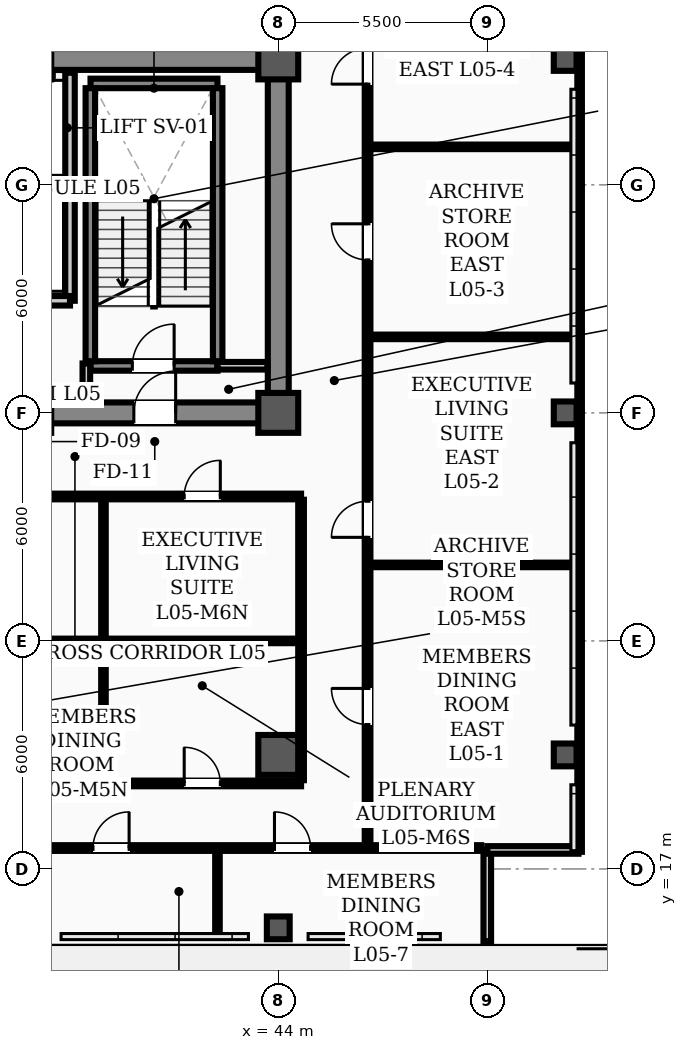
"""IFC4 building model, lengths in metres.
Left out: names, types, materials, properties, quantities, classifications, styles, units other than length and angle.
Written with IfcOpenShell. Run it as: python <this file> out.ifc"""

import sys

from ifc_helpers import new_model, si_unit, direction, frame, frame_2d, origin, origin_2d, place, context, subcontext, project, spatial, rectangle, hollow_rectangle, extrude, element, fill, save


model = new_model("IFC4")
c1 = context("Model", 3, precision=1e-05, world=origin(), true_north=direction((0.0, 1.0)))
c2 = subcontext(c1, "Body", "Model", "MODEL_VIEW")
j1 = project(units=[si_unit("LENGTHUNIT", "METRE"), si_unit("PLANEANGLEUNIT", "RADIAN")], contexts=[c1])
p1 = place(None, origin())
s1 = spatial("IfcSite", under=j1, at=p1, CompositionType="ELEMENT")
p2 = place(p1, origin())
s2 = spatial("IfcBuilding", under=s1, at=p2, CompositionType="ELEMENT")
p3 = place(p2, frame((0.0, 0.0, 22.0)))
s3 = spatial("IfcBuildingStorey", under=s2, at=p3, CompositionType="ELEMENT", Elevation=22.0)
for number, where, z_axis, x_axis in (
    (1, (44.0, 29.0, 0.0), (0.0, 0.0, 1.0), (1.0, 0.0, 0.0)),
    (2, (44.0, 38.3, 0.0), (0.0, 0.0, 1.0), (1.0, 0.0, 0.0)),
    (3, (44.0, 20.0, 0.0), (0.0, 0.0, 1.0), (1.0, 0.0, 0.0)),
):
    element("IfcColumn", number, at=place(p3, frame(where, z_axis=z_axis, x_axis=x_axis)), inside=s3, PredefinedType="COLUMN", context=c2, shape_type="SweptSolid", body=[
        extrude(hollow_rectangle(XDim=1.05, YDim=1.05, WallThickness=0.038, InnerFilletRadius=0.019, OuterFilletRadius=0.057, at=origin_2d()), origin(), (0.0, 0.0, 1.0), 4.5),
    ])
for number, where, z_axis, x_axis in (
    (4, (44.0, 15.45, 0.0), (0.0, 0.0, 1.0), (1.0, 0.0, 0.0)),
    (5, (51.55, 20.0, 0.0), (0.0, 0.0, 1.0), (1.0, 0.0, 0.0)),
    (6, (51.55, 29.0, 0.0), (0.0, 0.0, 1.0), (1.0, 0.0, 0.0)),
    (7, (51.55, 38.3, 0.0), (0.0, 0.0, 1.0), (1.0, 0.0, 0.0)),
):
    element("IfcColumn", number, at=place(p3, frame(where, z_axis=z_axis, x_axis=x_axis)), inside=s3, PredefinedType="COLUMN", context=c2, shape_type="SweptSolid", body=[
        extrude(hollow_rectangle(XDim=0.6, YDim=0.6, WallThickness=0.026, InnerFilletRadius=0.013, OuterFilletRadius=0.039, at=origin_2d()), origin(), (0.0, 0.0, 1.0), 4.5),
    ])
for number, where, z_axis, x_axis in (
    (8, (49.5, 15.1, 0.0), (0.0, 0.0, 1.0), (0.0, 1.0, 0.0)),
    (9, (49.5, 17.5, 0.0), (0.0, 0.0, 1.0), (1.0, 0.0, 0.0)),
):
    element("IfcWall", number, at=place(p3, frame(where, z_axis=z_axis, x_axis=x_axis)), inside=s3, PredefinedType="PARAPET", context=c2, shape_type="SweptSolid", body=[
        extrude(rectangle(XDim=2.4, YDim=0.2, at=frame_2d((1.2, 0.0))), origin(), (0.0, 0.0, 1.0), 1.2),
    ])
p4 = place(p3, frame((51.93, 17.45, 0.0), z_axis=(0.0, 0.0, 1.0), x_axis=(0.0, 1.0, 0.0)))
e10 = element("IfcWall", 10, at=p4, inside=s3, PredefinedType="PARAPET", context=c2, shape_type="SweptSolid", body=[
    extrude(rectangle(XDim=27.1, YDim=0.12, at=frame_2d((13.55, 0.0))), origin(), (0.0, 0.0, 1.0), 1.2),
])
p5 = place(p3, frame((13.5, 29.0, 0.0), z_axis=(0.0, 0.0, 1.0), x_axis=(1.0, 0.0, 0.0)))
e11 = element("IfcWall", 11, at=p5, inside=s3, PredefinedType="SHEAR", context=c2, shape_type="SweptSolid", body=[
    extrude(rectangle(XDim=30.5, YDim=0.55, at=frame_2d((15.25, 0.0))), origin(), (0.0, 0.0, 1.0), 4.32),
])
p6 = place(p5, frame((1.75, 0.0, 0.0)))
e12 = element("IfcOpeningElement", 12, at=p6, cuts=e11, PredefinedType="OPENING", context=c2, shape_type="SweptSolid", body=[
    extrude(rectangle(XDim=1.1, YDim=2.08, at=frame_2d((0.55, 1.04))), frame((0.0, 0.285, 0.0), z_axis=(0.0, -1.0, 0.0), x_axis=(1.0, 0.0, 0.0)), (0.0, 0.0, 1.0), 0.57),
])
p7 = place(p5, frame((26.7, 0.0, 0.0)))
e13 = element("IfcOpeningElement", 13, at=p7, cuts=e11, PredefinedType="OPENING", context=c2, shape_type="SweptSolid", body=[
    extrude(rectangle(XDim=1.1, YDim=2.08, at=frame_2d((0.55, 1.04))), frame((0.0, 0.285, 0.0), z_axis=(0.0, -1.0, 0.0), x_axis=(1.0, 0.0, 0.0)), (0.0, 0.0, 1.0), 0.57),
])
p8 = place(p5, frame((6.8, 0.0, 0.0)))
e14 = element("IfcOpeningElement", 14, at=p8, cuts=e11, PredefinedType="OPENING", context=c2, shape_type="SweptSolid", body=[
    extrude(rectangle(XDim=1.1, YDim=2.08, at=frame_2d((0.55, 1.04))), frame((0.0, 0.285, 0.0), z_axis=(0.0, -1.0, 0.0), x_axis=(1.0, 0.0, 0.0)), (0.0, 0.0, 1.0), 0.57),
])
p9 = place(p5, frame((13.2, 0.0, 0.0)))
e15 = element("IfcOpeningElement", 15, at=p9, cuts=e11, PredefinedType="OPENING", context=c2, shape_type="SweptSolid", body=[
    extrude(rectangle(XDim=1.6, YDim=2.08, at=frame_2d((0.8, 1.04))), frame((0.0, 0.285, 0.0), z_axis=(0.0, -1.0, 0.0), x_axis=(1.0, 0.0, 0.0)), (0.0, 0.0, 1.0), 0.57),
])
p10 = place(p5, frame((19.5, 0.0, 0.0)))
e16 = element("IfcOpeningElement", 16, at=p10, cuts=e11, PredefinedType="OPENING", context=c2, shape_type="SweptSolid", body=[
    extrude(rectangle(XDim=0.9, YDim=2.08, at=frame_2d((0.45, 1.04))), frame((0.0, 0.285, 0.0), z_axis=(0.0, -1.0, 0.0), x_axis=(1.0, 0.0, 0.0)), (0.0, 0.0, 1.0), 0.57),
])
p11 = place(p5, frame((21.55, 0.0, 0.0)))
e17 = element("IfcOpeningElement", 17, at=p11, cuts=e11, PredefinedType="OPENING", context=c2, shape_type="SweptSolid", body=[
    extrude(rectangle(XDim=0.9, YDim=2.08, at=frame_2d((0.45, 1.04))), frame((0.0, 0.285, 0.0), z_axis=(0.0, -1.0, 0.0), x_axis=(1.0, 0.0, 0.0)), (0.0, 0.0, 1.0), 0.57),
])
p12 = place(p3, frame((13.5, 38.3, 0.0), z_axis=(0.0, 0.0, 1.0), x_axis=(1.0, 0.0, 0.0)))
e18 = element("IfcWall", 18, at=p12, inside=s3, PredefinedType="SHEAR", context=c2, shape_type="SweptSolid", body=[
    extrude(rectangle(XDim=30.5, YDim=0.55, at=frame_2d((15.25, 0.0))), origin(), (0.0, 0.0, 1.0), 4.32),
])
p13 = place(p3, frame((44.0, 29.35, 0.0), z_axis=(0.0, 0.0, 1.0), x_axis=(0.0, 1.0, 0.0)))
e19 = element("IfcWall", 19, at=p13, inside=s3, PredefinedType="SHEAR", context=c2, shape_type="SweptSolid", body=[
    extrude(rectangle(XDim=8.6, YDim=0.55, at=frame_2d((4.3, 0.0))), origin(), (0.0, 0.0, 1.0), 4.32),
])
p14 = place(p3, frame((39.06, 30.235, 0.0), z_axis=(0.0, 0.0, 1.0), x_axis=(1.0, 0.0, 0.0)))
e20 = element("IfcWall", 20, at=p14, inside=s3, PredefinedType="STANDARD", context=c2, shape_type="SweptSolid", body=[
    extrude(rectangle(XDim=3.34, YDim=0.25, at=frame_2d((1.67, 0.0))), origin(), (0.0, 0.0, 1.0), 4.32),
])
p15 = place(p14, frame((1.1, 0.0, 0.0)))
e21 = element("IfcOpeningElement", 21, at=p15, cuts=e20, PredefinedType="OPENING", context=c2, shape_type="SweptSolid", body=[
    extrude(rectangle(XDim=1.1, YDim=2.08, at=frame_2d((0.55, 1.04))), frame((0.0, 0.135, 0.0), z_axis=(0.0, -1.0, 0.0), x_axis=(1.0, 0.0, 0.0)), (0.0, 0.0, 1.0), 0.27),
])
p16 = place(p3, frame((39.06, 37.669, 0.0), z_axis=(0.0, 0.0, 1.0), x_axis=(1.0, 0.0, 0.0)))
e22 = element("IfcWall", 22, at=p16, inside=s3, PredefinedType="STANDARD", context=c2, shape_type="SweptSolid", body=[
    extrude(rectangle(XDim=3.34, YDim=0.25, at=frame_2d((1.67, 0.0))), origin(), (0.0, 0.0, 1.0), 4.32),
])
for number, where, z_axis, x_axis in (
    (23, (39.055, 30.36, 0.0), (0.0, 0.0, 1.0), (0.0, 1.0, 0.0)),
    (24, (42.405, 30.36, 0.0), (0.0, 0.0, 1.0), (0.0, 1.0, 0.0)),
):
    element("IfcWall", number, at=place(p3, frame(where, z_axis=z_axis, x_axis=x_axis)), inside=s3, PredefinedType="STANDARD", context=c2, shape_type="SweptSolid", body=[
        extrude(rectangle(XDim=7.184, YDim=0.25, at=frame_2d((3.592, 0.0))), origin(), (0.0, 0.0, 1.0), 4.32),
    ])
p17 = place(p3, frame((38.52, 31.95, 0.0), z_axis=(0.0, 0.0, 1.0), x_axis=(0.0, 1.0, 0.0)))
e25 = element("IfcWall", 25, at=p17, inside=s3, PredefinedType="STANDARD", context=c2, shape_type="SweptSolid", body=[
    extrude(rectangle(XDim=6.0, YDim=0.25, at=frame_2d((3.0, 0.0))), origin(), (0.0, 0.0, 1.0), 3.9),
])
p18 = place(p3, frame((36.62, 31.95, 0.0), z_axis=(0.0, 0.0, 1.0), x_axis=(1.0, 0.0, 0.0)))
e26 = element("IfcWall", 26, at=p18, inside=s3, PredefinedType="STANDARD", context=c2, shape_type="SweptSolid", body=[
    extrude(rectangle(XDim=1.9, YDim=0.25, at=frame_2d((0.95, 0.0))), origin(), (0.0, 0.0, 1.0), 4.08),
])
p19 = place(p3, frame((42.4, 30.24, 0.0), z_axis=(0.0, 0.0, 1.0), x_axis=(1.0, 0.0, 0.0)))
e27 = element("IfcWall", 27, at=p19, inside=s3, PredefinedType="STANDARD", context=c2, shape_type="SweptSolid", body=[
    extrude(rectangle(XDim=1.315, YDim=0.2, at=frame_2d((0.658, 0.0))), origin(), (0.0, 0.0, 1.0), 3.7),
])
p20 = place(p3, frame((12.9, 26.8, 0.0), z_axis=(0.0, 0.0, 1.0), x_axis=(1.0, 0.0, 0.0)))
e28 = element("IfcWall", 28, at=p20, inside=s3, PredefinedType="PARTITIONING", context=c2, shape_type="SweptSolid", body=[
    extrude(rectangle(XDim=31.7, YDim=0.15, at=frame_2d((15.85, 0.0))), origin(), (0.0, 0.0, 1.0), 3.7),
])
p21 = place(p20, frame((13.6, 0.0, 0.0)))
e29 = element("IfcOpeningElement", 29, at=p21, cuts=e28, PredefinedType="OPENING", context=c2, shape_type="SweptSolid", body=[
    extrude(rectangle(XDim=1.6, YDim=2.08, at=frame_2d((0.8, 1.04))), frame((0.0, 0.085, 0.0), z_axis=(0.0, -1.0, 0.0), x_axis=(1.0, 0.0, 0.0)), (0.0, 0.0, 1.0), 0.17),
])
p22 = place(p20, frame((1.775, 0.0, 0.0)))
e30 = element("IfcOpeningElement", 30, at=p22, cuts=e28, PredefinedType="OPENING", context=c2, shape_type="SweptSolid", body=[
    extrude(rectangle(XDim=0.95, YDim=2.08, at=frame_2d((0.475, 1.04))), frame((0.0, 0.085, 0.0), z_axis=(0.0, -1.0, 0.0), x_axis=(1.0, 0.0, 0.0)), (0.0, 0.0, 1.0), 0.17),
])
p23 = place(p20, frame((6.225, 0.0, 0.0)))
e31 = element("IfcOpeningElement", 31, at=p23, cuts=e28, PredefinedType="OPENING", context=c2, shape_type="SweptSolid", body=[
    extrude(rectangle(XDim=0.95, YDim=2.08, at=frame_2d((0.475, 1.04))), frame((0.0, 0.085, 0.0), z_axis=(0.0, -1.0, 0.0), x_axis=(1.0, 0.0, 0.0)), (0.0, 0.0, 1.0), 0.17),
])
p24 = place(p20, frame((10.625, 0.0, 0.0)))
e32 = element("IfcOpeningElement", 32, at=p24, cuts=e28, PredefinedType="OPENING", context=c2, shape_type="SweptSolid", body=[
    extrude(rectangle(XDim=0.95, YDim=2.08, at=frame_2d((0.475, 1.04))), frame((0.0, 0.085, 0.0), z_axis=(0.0, -1.0, 0.0), x_axis=(1.0, 0.0, 0.0)), (0.0, 0.0, 1.0), 0.17),
])
p25 = place(p20, frame((16.075, 0.0, 0.0)))
e33 = element("IfcOpeningElement", 33, at=p25, cuts=e28, PredefinedType="OPENING", context=c2, shape_type="SweptSolid", body=[
    extrude(rectangle(XDim=0.95, YDim=2.08, at=frame_2d((0.475, 1.04))), frame((0.0, 0.085, 0.0), z_axis=(0.0, -1.0, 0.0), x_axis=(1.0, 0.0, 0.0)), (0.0, 0.0, 1.0), 0.17),
])
p26 = place(p20, frame((21.925, 0.0, 0.0)))
e34 = element("IfcOpeningElement", 34, at=p26, cuts=e28, PredefinedType="OPENING", context=c2, shape_type="SweptSolid", body=[
    extrude(rectangle(XDim=0.95, YDim=2.08, at=frame_2d((0.475, 1.04))), frame((0.0, 0.085, 0.0), z_axis=(0.0, -1.0, 0.0), x_axis=(1.0, 0.0, 0.0)), (0.0, 0.0, 1.0), 0.17),
])
p27 = place(p20, frame((28.625, 0.0, 0.0)))
e35 = element("IfcOpeningElement", 35, at=p27, cuts=e28, PredefinedType="OPENING", context=c2, shape_type="SweptSolid", body=[
    extrude(rectangle(XDim=0.95, YDim=2.08, at=frame_2d((0.475, 1.04))), frame((0.0, 0.085, 0.0), z_axis=(0.0, -1.0, 0.0), x_axis=(1.0, 0.0, 0.0)), (0.0, 0.0, 1.0), 0.17),
])
p28 = place(p3, frame((4.66, 17.55, 0.0), z_axis=(0.0, 0.0, 1.0), x_axis=(1.0, 0.0, 0.0)))
e36 = element("IfcWall", 36, at=p28, inside=s3, PredefinedType="PARTITIONING", context=c2, shape_type="SweptSolid", body=[
    extrude(rectangle(XDim=44.68, YDim=0.15, at=frame_2d((22.34, 0.0))), origin(), (0.0, 0.0, 1.0), 3.7),
])
p29 = place(p28, frame((6.74, 0.0, 0.0)))
e37 = element("IfcOpeningElement", 37, at=p29, cuts=e36, PredefinedType="OPENING", context=c2, shape_type="SweptSolid", body=[
    extrude(rectangle(XDim=0.95, YDim=2.08, at=frame_2d((0.475, 1.04))), frame((0.0, 0.085, 0.0), z_axis=(0.0, -1.0, 0.0), x_axis=(1.0, 0.0, 0.0)), (0.0, 0.0, 1.0), 0.17),
])
p30 = place(p28, frame((13.865, 0.0, 0.0)))
e38 = element("IfcOpeningElement", 38, at=p30, cuts=e36, PredefinedType="OPENING", context=c2, shape_type="SweptSolid", body=[
    extrude(rectangle(XDim=0.95, YDim=2.08, at=frame_2d((0.475, 1.04))), frame((0.0, 0.085, 0.0), z_axis=(0.0, -1.0, 0.0), x_axis=(1.0, 0.0, 0.0)), (0.0, 0.0, 1.0), 0.17),
])
p31 = place(p28, frame((28.765, 0.0, 0.0)))
e39 = element("IfcOpeningElement", 39, at=p31, cuts=e36, PredefinedType="OPENING", context=c2, shape_type="SweptSolid", body=[
    extrude(rectangle(XDim=0.95, YDim=2.08, at=frame_2d((0.475, 1.04))), frame((0.0, 0.085, 0.0), z_axis=(0.0, -1.0, 0.0), x_axis=(1.0, 0.0, 0.0)), (0.0, 0.0, 1.0), 0.17),
])
p32 = place(p28, frame((34.465, 0.0, 0.0)))
e40 = element("IfcOpeningElement", 40, at=p32, cuts=e36, PredefinedType="OPENING", context=c2, shape_type="SweptSolid", body=[
    extrude(rectangle(XDim=0.95, YDim=2.08, at=frame_2d((0.475, 1.04))), frame((0.0, 0.085, 0.0), z_axis=(0.0, -1.0, 0.0), x_axis=(1.0, 0.0, 0.0)), (0.0, 0.0, 1.0), 0.17),
])
p33 = place(p28, frame((39.24, 0.0, 0.0)))
e41 = element("IfcOpeningElement", 41, at=p33, cuts=e36, PredefinedType="OPENING", context=c2, shape_type="SweptSolid", body=[
    extrude(rectangle(XDim=0.95, YDim=2.08, at=frame_2d((0.475, 1.04))), frame((0.0, 0.085, 0.0), z_axis=(0.0, -1.0, 0.0), x_axis=(1.0, 0.0, 0.0)), (0.0, 0.0, 1.0), 0.17),
])
p34 = place(p3, frame((28.4, 19.25, 0.0), z_axis=(0.0, 0.0, 1.0), x_axis=(1.0, 0.0, 0.0)))
e42 = element("IfcWall", 42, at=p34, inside=s3, PredefinedType="PARTITIONING", context=c2, shape_type="SweptSolid", body=[
    extrude(rectangle(XDim=16.2, YDim=0.15, at=frame_2d((8.1, 0.0))), origin(), (0.0, 0.0, 1.0), 3.7),
])
p35 = place(p34, frame((0.575, 0.0, 0.0)))
e43 = element("IfcOpeningElement", 43, at=p35, cuts=e42, PredefinedType="OPENING", context=c2, shape_type="SweptSolid", body=[
    extrude(rectangle(XDim=0.95, YDim=2.08, at=frame_2d((0.475, 1.04))), frame((0.0, 0.085, 0.0), z_axis=(0.0, -1.0, 0.0), x_axis=(1.0, 0.0, 0.0)), (0.0, 0.0, 1.0), 0.17),
])
p36 = place(p34, frame((6.425, 0.0, 0.0)))
e44 = element("IfcOpeningElement", 44, at=p36, cuts=e42, PredefinedType="OPENING", context=c2, shape_type="SweptSolid", body=[
    extrude(rectangle(XDim=0.95, YDim=2.08, at=frame_2d((0.475, 1.04))), frame((0.0, 0.085, 0.0), z_axis=(0.0, -1.0, 0.0), x_axis=(1.0, 0.0, 0.0)), (0.0, 0.0, 1.0), 0.17),
])
p37 = place(p34, frame((13.125, 0.0, 0.0)))
e45 = element("IfcOpeningElement", 45, at=p37, cuts=e42, PredefinedType="OPENING", context=c2, shape_type="SweptSolid", body=[
    extrude(rectangle(XDim=0.95, YDim=2.08, at=frame_2d((0.475, 1.04))), frame((0.0, 0.085, 0.0), z_axis=(0.0, -1.0, 0.0), x_axis=(1.0, 0.0, 0.0)), (0.0, 0.0, 1.0), 0.17),
])
p38 = place(p3, frame((33.0, 23.0, 0.0), z_axis=(0.0, 0.0, 1.0), x_axis=(1.0, 0.0, 0.0)))
e46 = element("IfcWall", 46, at=p38, inside=s3, PredefinedType="PARTITIONING", context=c2, shape_type="SweptSolid", body=[
    extrude(rectangle(XDim=6.4, YDim=0.12, at=frame_2d((3.2, 0.0))), origin(), (0.0, 0.0, 1.0), 3.7),
])
p39 = place(p3, frame((39.4, 23.0, 0.0), z_axis=(0.0, 0.0, 1.0), x_axis=(1.0, 0.0, 0.0)))
e47 = element("IfcWall", 47, at=p39, inside=s3, PredefinedType="PARTITIONING", context=c2, shape_type="SweptSolid", body=[
    extrude(rectangle(XDim=5.2, YDim=0.12, at=frame_2d((2.6, 0.0))), origin(), (0.0, 0.0, 1.0), 3.7),
])
for number, where, z_axis, x_axis in (
    (48, (46.35, 25.0, 0.0), (0.0, 0.0, 1.0), (1.0, 0.0, 0.0)),
    (49, (46.35, 31.0, 0.0), (0.0, 0.0, 1.0), (1.0, 0.0, 0.0)),
    (50, (46.35, 36.0, 0.0), (0.0, 0.0, 1.0), (1.0, 0.0, 0.0)),
):
    element("IfcWall", number, at=place(p3, frame(where, z_axis=z_axis, x_axis=x_axis)), inside=s3, PredefinedType="PARTITIONING", context=c2, shape_type="SweptSolid", body=[
        extrude(rectangle(XDim=5.34, YDim=0.12, at=frame_2d((2.67, 0.0))), origin(), (0.0, 0.0, 1.0), 3.812),
    ])
p40 = place(p3, frame((38.95, 29.285, 0.0), z_axis=(0.0, 0.0, 1.0), x_axis=(0.0, 1.0, 0.0)))
e51 = element("IfcWall", 51, at=p40, inside=s3, PredefinedType="STANDARD", context=c2, shape_type="SweptSolid", body=[
    extrude(rectangle(XDim=1.015, YDim=0.2, at=frame_2d((0.508, 0.0))), origin(), (0.0, 0.0, 1.0), 3.9),
])
p41 = place(p3, frame((46.35, 17.635, 0.0), z_axis=(0.0, 0.0, 1.0), x_axis=(0.0, 1.0, 0.0)))
e52 = element("IfcWall", 52, at=p41, inside=s3, PredefinedType="PARTITIONING", context=c2, shape_type="SweptSolid", body=[
    extrude(rectangle(XDim=22.53, YDim=0.15, at=frame_2d((11.265, 0.0))), origin(), (0.0, 0.0, 1.0), 3.6),
])
p42 = place(p41, frame((3.165, 0.0, 0.0)))
e53 = element("IfcOpeningElement", 53, at=p42, cuts=e52, PredefinedType="OPENING", context=c2, shape_type="SweptSolid", body=[
    extrude(rectangle(XDim=0.95, YDim=2.08, at=frame_2d((0.475, 1.04))), frame((0.0, 0.085, 0.0), z_axis=(0.0, -1.0, 0.0), x_axis=(1.0, 0.0, 0.0)), (0.0, 0.0, 1.0), 0.17),
])
p43 = place(p41, frame((8.09, 0.0, 0.0)))
e54 = element("IfcOpeningElement", 54, at=p43, cuts=e52, PredefinedType="OPENING", context=c2, shape_type="SweptSolid", body=[
    extrude(rectangle(XDim=0.95, YDim=2.08, at=frame_2d((0.475, 1.04))), frame((0.0, 0.085, 0.0), z_axis=(0.0, -1.0, 0.0), x_axis=(1.0, 0.0, 0.0)), (0.0, 0.0, 1.0), 0.17),
])
p44 = place(p41, frame((15.39, 0.0, 0.0)))
e55 = element("IfcOpeningElement", 55, at=p44, cuts=e52, PredefinedType="OPENING", context=c2, shape_type="SweptSolid", body=[
    extrude(rectangle(XDim=0.95, YDim=2.08, at=frame_2d((0.475, 1.04))), frame((0.0, 0.085, 0.0), z_axis=(0.0, -1.0, 0.0), x_axis=(1.0, 0.0, 0.0)), (0.0, 0.0, 1.0), 0.17),
])
p45 = place(p41, frame((20.015, 0.0, 0.0)))
e56 = element("IfcOpeningElement", 56, at=p45, cuts=e52, PredefinedType="OPENING", context=c2, shape_type="SweptSolid", body=[
    extrude(rectangle(XDim=0.95, YDim=2.08, at=frame_2d((0.475, 1.04))), frame((0.0, 0.085, 0.0), z_axis=(0.0, -1.0, 0.0), x_axis=(1.0, 0.0, 0.0)), (0.0, 0.0, 1.0), 0.17),
])
p46 = place(p3, frame((44.6, 19.335, 0.0), z_axis=(0.0, 0.0, 1.0), x_axis=(0.0, 1.0, 0.0)))
e57 = element("IfcWall", 57, at=p46, inside=s3, PredefinedType="PARTITIONING", context=c2, shape_type="SweptSolid", body=[
    extrude(rectangle(XDim=7.38, YDim=0.15, at=frame_2d((3.69, 0.0))), origin(), (0.0, 0.0, 1.0), 3.6),
])
p47 = place(p3, frame((42.4, 15.31, 0.0), z_axis=(0.0, 0.0, 1.0), x_axis=(0.0, 1.0, 0.0)))
e58 = element("IfcWall", 58, at=p47, inside=s3, PredefinedType="PARTITIONING", context=c2, shape_type="SweptSolid", body=[
    extrude(rectangle(XDim=2.155, YDim=0.12, at=frame_2d((1.078, 0.0))), origin(), (0.0, 0.0, 1.0), 3.812),
])
p48 = place(p3, frame((39.4, 19.335, 0.0), z_axis=(0.0, 0.0, 1.0), x_axis=(0.0, 1.0, 0.0)))
e59 = element("IfcWall", 59, at=p48, inside=s3, PredefinedType="PARTITIONING", context=c2, shape_type="SweptSolid", body=[
    extrude(rectangle(XDim=7.38, YDim=0.12, at=frame_2d((3.69, 0.0))), origin(), (0.0, 0.0, 1.0), 3.6),
])
p49 = place(p15, origin())
e60 = element("IfcDoor", 60, at=p49, inside=s3, OperationType="SINGLE_SWING_RIGHT", PredefinedType="DOOR", context=c2, shape_type="SweptSolid", body=[
    extrude(rectangle(XDim=1.1, YDim=2.08, at=frame_2d((0.55, 1.04))), frame((0.0, 0.025, 0.0), z_axis=(0.0, -1.0, 0.0), x_axis=(1.0, 0.0, 0.0)), (0.0, 0.0, 1.0), 0.05),
])
fill(e21, e60)
p50 = place(p7, origin())
e61 = element("IfcDoor", 61, at=p50, inside=s3, OperationType="SINGLE_SWING_RIGHT", PredefinedType="DOOR", context=c2, shape_type="SweptSolid", body=[
    extrude(rectangle(XDim=1.1, YDim=2.08, at=frame_2d((0.55, 1.04))), frame((0.0, 0.025, 0.0), z_axis=(0.0, -1.0, 0.0), x_axis=(1.0, 0.0, 0.0)), (0.0, 0.0, 1.0), 0.05),
])
fill(e13, e61)
p51 = place(p32, origin())
e62 = element("IfcDoor", 62, at=p51, inside=s3, OperationType="SINGLE_SWING_RIGHT", PredefinedType="DOOR", context=c2, shape_type="SweptSolid", body=[
    extrude(rectangle(XDim=0.95, YDim=2.08, at=frame_2d((0.475, 1.04))), frame((0.0, 0.025, 0.0), z_axis=(0.0, -1.0, 0.0), x_axis=(1.0, 0.0, 0.0)), (0.0, 0.0, 1.0), 0.05),
])
fill(e40, e62)
p52 = place(p33, origin())
e63 = element("IfcDoor", 63, at=p52, inside=s3, OperationType="SINGLE_SWING_LEFT", PredefinedType="DOOR", context=c2, shape_type="SweptSolid", body=[
    extrude(rectangle(XDim=0.95, YDim=2.08, at=frame_2d((0.475, 1.04))), frame((0.0, 0.025, 0.0), z_axis=(0.0, -1.0, 0.0), x_axis=(1.0, 0.0, 0.0)), (0.0, 0.0, 1.0), 0.05),
])
fill(e41, e63)
p53 = place(p27, origin())
e64 = element("IfcDoor", 64, at=p53, inside=s3, OperationType="SINGLE_SWING_RIGHT", PredefinedType="DOOR", context=c2, shape_type="SweptSolid", body=[
    extrude(rectangle(XDim=0.95, YDim=2.08, at=frame_2d((0.475, 1.04))), frame((0.0, 0.025, 0.0), z_axis=(0.0, -1.0, 0.0), x_axis=(1.0, 0.0, 0.0)), (0.0, 0.0, 1.0), 0.05),
])
fill(e35, e64)
p54 = place(p37, origin())
e65 = element("IfcDoor", 65, at=p54, inside=s3, OperationType="SINGLE_SWING_LEFT", PredefinedType="DOOR", context=c2, shape_type="SweptSolid", body=[
    extrude(rectangle(XDim=0.95, YDim=2.08, at=frame_2d((0.475, 1.04))), frame((0.0, 0.025, 0.0), z_axis=(0.0, -1.0, 0.0), x_axis=(1.0, 0.0, 0.0)), (0.0, 0.0, 1.0), 0.05),
])
fill(e45, e65)
p55 = place(p42, origin())
e66 = element("IfcDoor", 66, at=p55, inside=s3, OperationType="SINGLE_SWING_RIGHT", PredefinedType="DOOR", context=c2, shape_type="SweptSolid", body=[
    extrude(rectangle(XDim=0.95, YDim=2.08, at=frame_2d((0.475, 1.04))), frame((0.0, 0.025, 0.0), z_axis=(0.0, -1.0, 0.0), x_axis=(1.0, 0.0, 0.0)), (0.0, 0.0, 1.0), 0.05),
])
fill(e53, e66)
p56 = place(p43, origin())
e67 = element("IfcDoor", 67, at=p56, inside=s3, OperationType="SINGLE_SWING_LEFT", PredefinedType="DOOR", context=c2, shape_type="SweptSolid", body=[
    extrude(rectangle(XDim=0.95, YDim=2.08, at=frame_2d((0.475, 1.04))), frame((0.0, 0.025, 0.0), z_axis=(0.0, -1.0, 0.0), x_axis=(1.0, 0.0, 0.0)), (0.0, 0.0, 1.0), 0.05),
])
fill(e54, e67)
p57 = place(p44, origin())
e68 = element("IfcDoor", 68, at=p57, inside=s3, OperationType="SINGLE_SWING_RIGHT", PredefinedType="DOOR", context=c2, shape_type="SweptSolid", body=[
    extrude(rectangle(XDim=0.95, YDim=2.08, at=frame_2d((0.475, 1.04))), frame((0.0, 0.025, 0.0), z_axis=(0.0, -1.0, 0.0), x_axis=(1.0, 0.0, 0.0)), (0.0, 0.0, 1.0), 0.05),
])
fill(e55, e68)
p58 = place(p45, origin())
e69 = element("IfcDoor", 69, at=p58, inside=s3, OperationType="SINGLE_SWING_LEFT", PredefinedType="DOOR", context=c2, shape_type="SweptSolid", body=[
    extrude(rectangle(XDim=0.95, YDim=2.08, at=frame_2d((0.475, 1.04))), frame((0.0, 0.025, 0.0), z_axis=(0.0, -1.0, 0.0), x_axis=(1.0, 0.0, 0.0)), (0.0, 0.0, 1.0), 0.05),
])
fill(e56, e69)
save(model, sys.argv[1])
